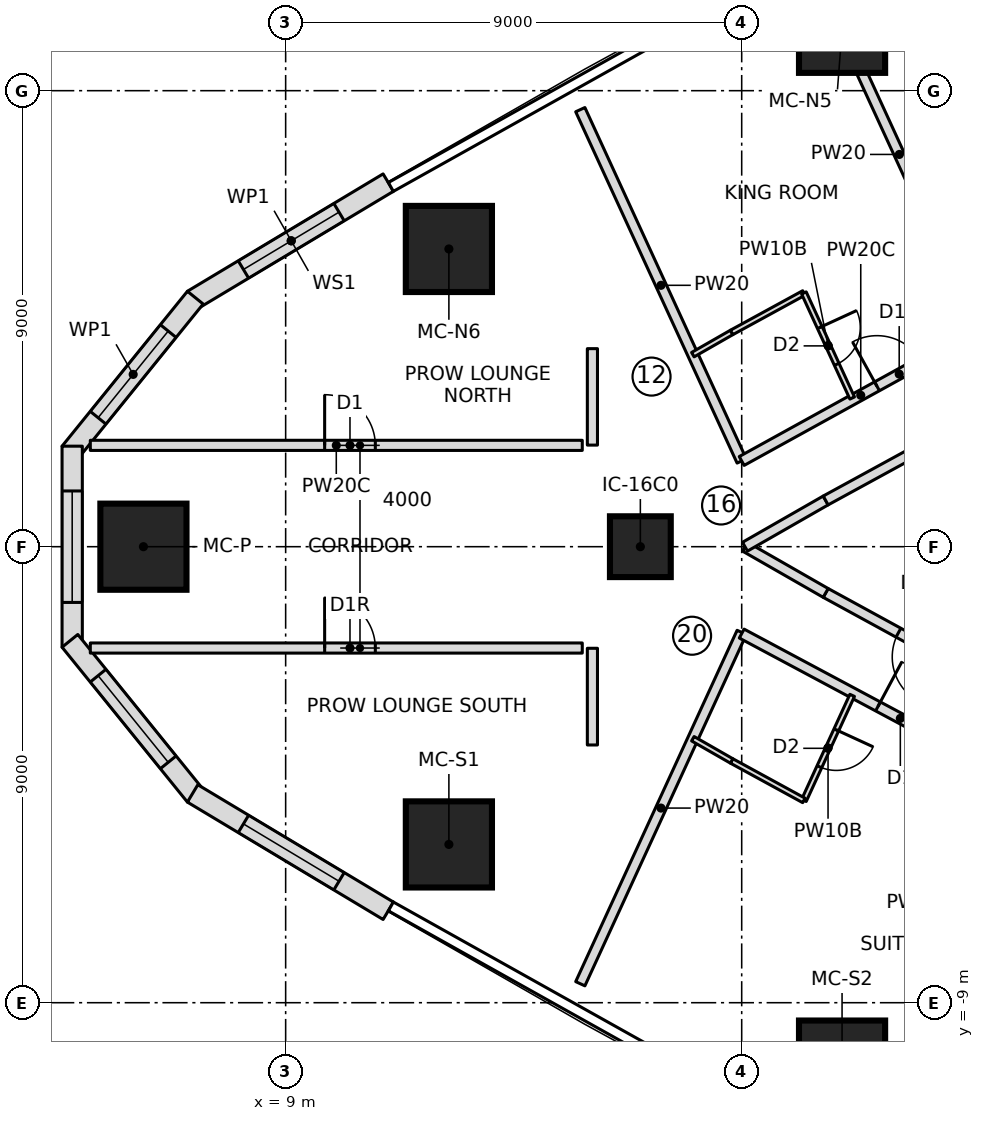
"""IFC4 building model, lengths in metres.
Left out: names, types, materials, properties, quantities, classifications, styles, units other than length and angle.
Written with IfcOpenShell. Run it as: python <this file> out.ifc"""

import sys

from ifc_helpers import new_model, si_unit, direction, frame, frame_2d, origin, origin_2d, place, context, subcontext, project, spatial, polyline, rectangle, outline, extrude, element, fill, save


model = new_model("IFC4")
c1 = context("Model", 3, precision=1e-05, world=origin(), true_north=direction((0.0, 1.0)))
c2 = subcontext(c1, "Body", "Model", "MODEL_VIEW")
j1 = project(units=[si_unit("LENGTHUNIT", "METRE"), si_unit("PLANEANGLEUNIT", "RADIAN")], contexts=[c1])
p1 = place(None, origin())
s1 = spatial("IfcSite", under=j1, at=p1, CompositionType="ELEMENT")
p2 = place(p1, origin())
s2 = spatial("IfcBuilding", under=s1, at=p2, CompositionType="ELEMENT")
p3 = place(p2, frame((0.0, 0.0, 84.9)))
s3 = spatial("IfcBuildingStorey", under=s2, at=p3, CompositionType="ELEMENT", Elevation=84.9)
for number, where, z_axis, x_axis in (
    (1, (6.193, 0.0, 0.0), (0.0, 0.0, 1.0), (1.0, 0.0, 0.0)),
    (2, (12.221, -5.876, 0.0), (0.0, 0.0, 1.0), (1.0, 0.0, 0.0)),
    (3, (19.981, -10.202, 0.0), (0.0, 0.0, 1.0), (1.0, 0.0, 0.0)),
    (4, (19.981, 10.202, 0.0), (0.0, 0.0, 1.0), (1.0, 0.0, 0.0)),
    (5, (12.221, 5.876, 0.0), (0.0, 0.0, 1.0), (1.0, 0.0, 0.0)),
):
    element("IfcColumn", number, at=place(p3, frame(where, z_axis=z_axis, x_axis=x_axis)), inside=s3, PredefinedType="COLUMN", context=c2, shape_type="SweptSolid", body=[
        extrude(rectangle(XDim=1.7, YDim=1.7, at=origin_2d()), origin(), (0.0, 0.0, 1.0), 3.55),
    ])
p4 = place(p3, frame((16.0, 0.0, 0.0), z_axis=(0.0, 0.0, 1.0), x_axis=(1.0, 0.0, 0.0)))
e6 = element("IfcColumn", 6, at=p4, inside=s3, PredefinedType="COLUMN", context=c2, shape_type="SweptSolid", body=[
    extrude(rectangle(XDim=1.2, YDim=1.2, at=origin_2d()), origin(), (0.0, 0.0, 1.0), 3.55),
])
p5 = place(p3, frame((11.026, 7.186, 0.0), z_axis=(0.0, 0.0, 1.0), x_axis=(-0.857550776474, -0.514399325202, 0.0)))
e7 = element("IfcWall", 7, at=p5, inside=s3, PredefinedType="NOTDEFINED", context=c2, shape_type="SweptSolid", body=[
    extrude(outline(polyline([(0.0, -0.2), (4.503, -0.2), (4.433, 0.2), (0.0, 0.2), (0.0, -0.2)])), origin(), (0.0, 0.0, 1.0), 3.25),
])
p6 = place(p5, frame((1.134, 0.0, 0.6)))
e8 = element("IfcOpeningElement", 8, at=p6, cuts=e7, PredefinedType="OPENING", context=c2, shape_type="SweptSolid", body=[
    extrude(outline(polyline([(0.0, 1.35), (0.084, 1.771), (0.322, 2.128), (0.679, 2.366), (1.1, 2.45), (1.521, 2.366), (1.878, 2.128), (2.116, 1.771), (2.2, 1.35), (2.2, 1.1), (2.116, 0.679), (1.878, 0.322), (1.521, 0.084), (1.1, 0.0), (0.679, 0.084), (0.322, 0.322), (0.084, 0.679), (0.0, 1.1), (0.0, 1.35)])), frame((0.0, 0.21, 0.0), z_axis=(0.0, -1.0, 0.0), x_axis=(1.0, 0.0, 0.0)), (0.0, 0.0, 1.0), 0.42),
])
p7 = place(p3, frame((7.194, 4.888, 0.0), z_axis=(0.0, 0.0, 1.0), x_axis=(-0.62903486133, -0.777377092042, 0.0)))
e9 = element("IfcWall", 9, at=p7, inside=s3, PredefinedType="NOTDEFINED", context=c2, shape_type="SweptSolid", body=[
    extrude(outline(polyline([(-0.035, -0.2), (3.897, -0.2), (3.756, 0.2), (0.035, 0.2), (-0.035, -0.2)])), origin(), (0.0, 0.0, 1.0), 3.25),
])
p8 = place(p7, frame((0.813, 0.0, 0.6)))
e10 = element("IfcOpeningElement", 10, at=p8, cuts=e9, PredefinedType="OPENING", context=c2, shape_type="SweptSolid", body=[
    extrude(outline(polyline([(0.0, 1.35), (0.084, 1.771), (0.322, 2.128), (0.679, 2.366), (1.1, 2.45), (1.521, 2.366), (1.878, 2.128), (2.116, 1.771), (2.2, 1.35), (2.2, 1.1), (2.116, 0.679), (1.878, 0.322), (1.521, 0.084), (1.1, 0.0), (0.679, 0.084), (0.322, 0.322), (0.084, 0.679), (0.0, 1.1), (0.0, 1.35)])), frame((0.0, 0.21, 0.0), z_axis=(0.0, -1.0, 0.0), x_axis=(1.0, 0.0, 0.0)), (0.0, 0.0, 1.0), 0.42),
])
p9 = place(p3, frame((4.787, 1.913, 0.0), z_axis=(0.0, 0.0, 1.0), x_axis=(0.0, -1.0, 0.0)))
e11 = element("IfcWall", 11, at=p9, inside=s3, PredefinedType="NOTDEFINED", context=c2, shape_type="SweptSolid", body=[
    extrude(outline(polyline([(-0.071, -0.2), (3.897, -0.2), (3.755, 0.2), (0.071, 0.2), (-0.071, -0.2)])), origin(), (0.0, 0.0, 1.0), 3.25),
])
p10 = place(p9, frame((0.813, 0.0, 0.6)))
e12 = element("IfcOpeningElement", 12, at=p10, cuts=e11, PredefinedType="OPENING", context=c2, shape_type="SweptSolid", body=[
    extrude(outline(polyline([(0.0, 1.35), (0.084, 1.771), (0.322, 2.128), (0.679, 2.366), (1.1, 2.45), (1.521, 2.366), (1.878, 2.128), (2.116, 1.771), (2.2, 1.35), (2.2, 1.1), (2.116, 0.679), (1.878, 0.322), (1.521, 0.084), (1.1, 0.0), (0.679, 0.084), (0.322, 0.322), (0.084, 0.679), (0.0, 1.1), (0.0, 1.35)])), frame((0.0, 0.21, 0.0), z_axis=(0.0, -1.0, 0.0), x_axis=(1.0, 0.0, 0.0)), (0.0, 0.0, 1.0), 0.42),
])
p11 = place(p3, frame((4.787, -1.913, 0.0), z_axis=(0.0, 0.0, 1.0), x_axis=(0.62903486133, -0.777377092042, 0.0)))
e13 = element("IfcWall", 13, at=p11, inside=s3, PredefinedType="NOTDEFINED", context=c2, shape_type="SweptSolid", body=[
    extrude(outline(polyline([(-0.071, -0.2), (3.862, -0.2), (3.791, 0.2), (0.071, 0.2), (-0.071, -0.2)])), origin(), (0.0, 0.0, 1.0), 3.25),
])
p12 = place(p11, frame((0.813, 0.0, 0.6)))
e14 = element("IfcOpeningElement", 14, at=p12, cuts=e13, PredefinedType="OPENING", context=c2, shape_type="SweptSolid", body=[
    extrude(outline(polyline([(0.0, 1.35), (0.084, 1.771), (0.322, 2.128), (0.679, 2.366), (1.1, 2.45), (1.521, 2.366), (1.878, 2.128), (2.116, 1.771), (2.2, 1.35), (2.2, 1.1), (2.116, 0.679), (1.878, 0.322), (1.521, 0.084), (1.1, 0.0), (0.679, 0.084), (0.322, 0.322), (0.084, 0.679), (0.0, 1.1), (0.0, 1.35)])), frame((0.0, 0.21, 0.0), z_axis=(0.0, -1.0, 0.0), x_axis=(1.0, 0.0, 0.0)), (0.0, 0.0, 1.0), 0.42),
])
p13 = place(p3, frame((7.194, -4.888, 0.0), z_axis=(0.0, 0.0, 1.0), x_axis=(0.857550776474, -0.514399325202, 0.0)))
e15 = element("IfcWall", 15, at=p13, inside=s3, PredefinedType="NOTDEFINED", context=c2, shape_type="SweptSolid", body=[
    extrude(outline(polyline([(-0.035, -0.2), (4.468, -0.2), (4.468, 0.2), (0.035, 0.2), (-0.035, -0.2)])), origin(), (0.0, 0.0, 1.0), 3.25),
])
p14 = place(p13, frame((1.134, 0.0, 0.6)))
e16 = element("IfcOpeningElement", 16, at=p14, cuts=e15, PredefinedType="OPENING", context=c2, shape_type="SweptSolid", body=[
    extrude(outline(polyline([(0.0, 1.35), (0.084, 1.771), (0.322, 2.128), (0.679, 2.366), (1.1, 2.45), (1.521, 2.366), (1.878, 2.128), (2.116, 1.771), (2.2, 1.35), (2.2, 1.1), (2.116, 0.679), (1.878, 0.322), (1.521, 0.084), (1.1, 0.0), (0.679, 0.084), (0.322, 0.322), (0.084, 0.679), (0.0, 1.1), (0.0, 1.35)])), frame((0.0, 0.21, 0.0), z_axis=(0.0, -1.0, 0.0), x_axis=(1.0, 0.0, 0.0)), (0.0, 0.0, 1.0), 0.42),
])
p15 = place(p3, frame((5.145, 2.0, 0.0), z_axis=(0.0, 0.0, 1.0), x_axis=(1.0, 0.0, 0.0)))
e17 = element("IfcWall", 17, at=p15, inside=s3, PredefinedType="PARTITIONING", context=c2, shape_type="SweptSolid", body=[
    extrude(rectangle(XDim=9.709, YDim=0.2, at=frame_2d((4.854, 0.0))), origin(), (0.0, 0.0, 1.0), 3.25),
])
p16 = place(p15, frame((4.625, 0.0, 0.0)))
e18 = element("IfcOpeningElement", 18, at=p16, cuts=e17, PredefinedType="OPENING", context=c2, shape_type="SweptSolid", body=[
    extrude(rectangle(XDim=1.0, YDim=2.1, at=frame_2d((0.5, 1.05))), frame((0.0, 0.11, 0.0), z_axis=(0.0, -1.0, 0.0), x_axis=(1.0, 0.0, 0.0)), (0.0, 0.0, 1.0), 0.22),
])
p17 = place(p3, frame((5.145, -2.0, 0.0), z_axis=(0.0, 0.0, 1.0), x_axis=(1.0, 0.0, 0.0)))
e19 = element("IfcWall", 19, at=p17, inside=s3, PredefinedType="PARTITIONING", context=c2, shape_type="SweptSolid", body=[
    extrude(rectangle(XDim=9.709, YDim=0.2, at=frame_2d((4.854, 0.0))), origin(), (0.0, 0.0, 1.0), 3.25),
])
p18 = place(p17, frame((4.625, 0.0, 0.0)))
e20 = element("IfcOpeningElement", 20, at=p18, cuts=e19, PredefinedType="OPENING", context=c2, shape_type="SweptSolid", body=[
    extrude(rectangle(XDim=1.0, YDim=2.1, at=frame_2d((0.5, 1.05))), frame((0.0, 0.11, 0.0), z_axis=(0.0, -1.0, 0.0), x_axis=(1.0, 0.0, 0.0)), (0.0, 0.0, 1.0), 0.22),
])
p19 = place(p3, frame((14.815, 8.626, 0.0), z_axis=(0.0, 0.0, 1.0), x_axis=(0.417432341259, -0.908708006166, 0.0)))
e21 = element("IfcWall", 21, at=p19, inside=s3, PredefinedType="PARTITIONING", context=c2, shape_type="SweptSolid", body=[
    extrude(rectangle(XDim=7.631, YDim=0.2, at=frame_2d((3.815, 0.0))), origin(), (0.0, 0.0, 1.0), 3.25),
])
p20 = place(p3, frame((18.0, 1.692, 0.0), z_axis=(0.0, 0.0, 1.0), x_axis=(0.875548487611, 0.483130257634, 0.0)))
e22 = element("IfcWall", 22, at=p20, inside=s3, PredefinedType="PARTITIONING", context=c2, shape_type="SweptSolid", body=[
    extrude(rectangle(XDim=5.367, YDim=0.2, at=frame_2d((2.683, 0.0))), origin(), (0.0, 0.0, 1.0), 3.25),
])
p21 = place(p20, frame((3.05, 0.0, 0.0)))
e23 = element("IfcOpeningElement", 23, at=p21, cuts=e22, PredefinedType="OPENING", context=c2, shape_type="SweptSolid", body=[
    extrude(rectangle(XDim=1.0, YDim=2.1, at=frame_2d((0.5, 1.05))), frame((0.0, 0.11, 0.0), z_axis=(0.0, -1.0, 0.0), x_axis=(1.0, 0.0, 0.0)), (0.0, 0.0, 1.0), 0.22),
])
p22 = place(p3, frame((17.036, 3.79, 0.0), z_axis=(0.0, 0.0, 1.0), x_axis=(0.867629162742, 0.497211862248, 0.0)))
e24 = element("IfcWall", 24, at=p22, inside=s3, PredefinedType="PARTITIONING", context=c2, shape_type="SweptSolid", body=[
    extrude(rectangle(XDim=0.882, YDim=0.1, at=frame_2d((0.441, 0.0))), origin(), (0.0, 0.0, 1.0), 3.25),
])
p23 = place(p3, frame((17.801, 4.229, 0.0), z_axis=(0.0, 0.0, 1.0), x_axis=(0.877424481957, 0.479714788663, 0.0)))
e25 = element("IfcWall", 25, at=p23, inside=s3, PredefinedType="PARTITIONING", context=c2, shape_type="SweptSolid", body=[
    extrude(rectangle(XDim=1.625, YDim=0.1, at=frame_2d((0.813, 0.0))), origin(), (0.0, 0.0, 1.0), 3.25),
])
p24 = place(p3, frame((19.228, 5.008, 0.0), z_axis=(0.0, 0.0, 1.0), x_axis=(0.417450047292, -0.908699872354, 0.0)))
e26 = element("IfcWall", 26, at=p24, inside=s3, PredefinedType="PARTITIONING", context=c2, shape_type="SweptSolid", body=[
    extrude(rectangle(XDim=2.283, YDim=0.1, at=frame_2d((1.141, 0.0))), origin(), (0.0, 0.0, 1.0), 3.25),
])
p25 = place(p24, frame((0.75, 0.0, 0.0)))
e27 = element("IfcOpeningElement", 27, at=p25, cuts=e26, PredefinedType="OPENING", context=c2, shape_type="SweptSolid", body=[
    extrude(rectangle(XDim=0.8, YDim=2.1, at=frame_2d((0.4, 1.05))), frame((0.0, 0.06, 0.0), z_axis=(0.0, -1.0, 0.0), x_axis=(1.0, 0.0, 0.0)), (0.0, 0.0, 1.0), 0.12),
])
p26 = place(p3, frame((22.699, 4.284, 0.0), z_axis=(0.0, 0.0, 1.0), x_axis=(-0.417413534969, 0.908716644959, 0.0)))
e28 = element("IfcWall", 28, at=p26, inside=s3, PredefinedType="PARTITIONING", context=c2, shape_type="SweptSolid", body=[
    extrude(rectangle(XDim=7.609, YDim=0.2, at=frame_2d((3.805, 0.0))), origin(), (0.0, 0.0, 1.0), 3.25),
])
p27 = place(p3, frame((14.815, -8.626, 0.0), z_axis=(0.0, 0.0, 1.0), x_axis=(0.417432341259, 0.908708006166, 0.0)))
e29 = element("IfcWall", 29, at=p27, inside=s3, PredefinedType="PARTITIONING", context=c2, shape_type="SweptSolid", body=[
    extrude(rectangle(XDim=7.631, YDim=0.2, at=frame_2d((3.815, 0.0))), origin(), (0.0, 0.0, 1.0), 3.25),
])
p28 = place(p3, frame((18.0, -1.715, 0.0), z_axis=(0.0, 0.0, 1.0), x_axis=(0.881859333365, -0.471512583244, 0.0)))
e30 = element("IfcWall", 30, at=p28, inside=s3, PredefinedType="PARTITIONING", context=c2, shape_type="SweptSolid", body=[
    extrude(rectangle(XDim=9.799, YDim=0.2, at=frame_2d((4.899, 0.0))), origin(), (0.0, 0.0, 1.0), 3.25),
])
p29 = place(p28, frame((3.05, 0.0, 0.0)))
e31 = element("IfcOpeningElement", 31, at=p29, cuts=e30, PredefinedType="OPENING", context=c2, shape_type="SweptSolid", body=[
    extrude(rectangle(XDim=1.0, YDim=2.1, at=frame_2d((0.5, 1.05))), frame((0.0, 0.11, 0.0), z_axis=(0.0, -1.0, 0.0), x_axis=(1.0, 0.0, 0.0)), (0.0, 0.0, 1.0), 0.22),
])
p30 = place(p3, frame((20.18, -2.934, 0.0), z_axis=(0.0, 0.0, 1.0), x_axis=(-0.417450047292, -0.908699872354, 0.0)))
e32 = element("IfcWall", 32, at=p30, inside=s3, PredefinedType="PARTITIONING", context=c2, shape_type="SweptSolid", body=[
    extrude(rectangle(XDim=2.283, YDim=0.1, at=frame_2d((1.141, 0.0))), origin(), (0.0, 0.0, 1.0), 3.25),
])
p31 = place(p30, frame((0.75, 0.0, 0.0)))
e33 = element("IfcOpeningElement", 33, at=p31, cuts=e32, PredefinedType="OPENING", context=c2, shape_type="SweptSolid", body=[
    extrude(rectangle(XDim=0.8, YDim=2.1, at=frame_2d((0.4, 1.05))), frame((0.0, 0.06, 0.0), z_axis=(0.0, -1.0, 0.0), x_axis=(1.0, 0.0, 0.0)), (0.0, 0.0, 1.0), 0.12),
])
p32 = place(p3, frame((19.228, -5.008, 0.0), z_axis=(0.0, 0.0, 1.0), x_axis=(-0.877424481957, 0.479714788663, 0.0)))
e34 = element("IfcWall", 34, at=p32, inside=s3, PredefinedType="PARTITIONING", context=c2, shape_type="SweptSolid", body=[
    extrude(rectangle(XDim=1.625, YDim=0.1, at=frame_2d((0.813, 0.0))), origin(), (0.0, 0.0, 1.0), 3.25),
])
p33 = place(p3, frame((17.801, -4.229, 0.0), z_axis=(0.0, 0.0, 1.0), x_axis=(-0.867629162742, 0.497211862248, 0.0)))
e35 = element("IfcWall", 35, at=p33, inside=s3, PredefinedType="PARTITIONING", context=c2, shape_type="SweptSolid", body=[
    extrude(rectangle(XDim=0.882, YDim=0.1, at=frame_2d((0.441, 0.0))), origin(), (0.0, 0.0, 1.0), 3.25),
])
p34 = place(p3, frame((23.407, -2.962, 0.0), z_axis=(0.0, 0.0, 1.0), x_axis=(-0.877465075585, 0.479640533242, 0.0)))
e36 = element("IfcWall", 36, at=p34, inside=s3, PredefinedType="PARTITIONING", context=c2, shape_type="SweptSolid", body=[
    extrude(rectangle(XDim=4.273, YDim=0.2, at=frame_2d((2.137, 0.0))), origin(), (0.0, 0.0, 1.0), 3.25),
])
p35 = place(p34, frame((1.636, 0.0, 0.0)))
e37 = element("IfcOpeningElement", 37, at=p35, cuts=e36, PredefinedType="OPENING", context=c2, shape_type="SweptSolid", body=[
    extrude(rectangle(XDim=1.0, YDim=2.1, at=frame_2d((0.5, 1.05))), frame((0.0, 0.11, 0.0), z_axis=(0.0, -1.0, 0.0), x_axis=(1.0, 0.0, 0.0)), (0.0, 0.0, 1.0), 0.22),
])
for number, where, z_axis, x_axis in (
    (38, (19.657, -0.912, 0.0), (0.0, 0.0, 1.0), (-0.868, 0.497, 0.0)),
    (39, (18.065, 0.0, 0.0), (0.0, 0.0, 1.0), (0.868, 0.497, 0.0)),
):
    element("IfcWall", number, at=place(p3, frame(where, z_axis=z_axis, x_axis=x_axis)), inside=s3, PredefinedType="PARTITIONING", context=c2, shape_type="SweptSolid", body=[
        extrude(rectangle(XDim=1.835, YDim=0.2, at=frame_2d((0.918, 0.0))), origin(), (0.0, 0.0, 1.0), 3.25),
    ])
p36 = place(p3, frame((19.657, 0.912, 0.0), z_axis=(0.0, 0.0, 1.0), x_axis=(0.877465075585, 0.479640533242, 0.0)))
e40 = element("IfcWall", 40, at=p36, inside=s3, PredefinedType="PARTITIONING", context=c2, shape_type="SweptSolid", body=[
    extrude(rectangle(XDim=4.273, YDim=0.2, at=frame_2d((2.137, 0.0))), origin(), (0.0, 0.0, 1.0), 3.25),
])
p37 = place(p3, frame((15.054, 3.909, 0.0), z_axis=(0.0, 0.0, 1.0), x_axis=(0.0, -1.0, 0.0)))
e41 = element("IfcWall", 41, at=p37, inside=s3, PredefinedType="PARTITIONING", context=c2, shape_type="SweptSolid", body=[
    extrude(rectangle(XDim=1.904, YDim=0.2, at=frame_2d((0.952, 0.0))), origin(), (0.0, 0.0, 1.0), 3.25),
])
p38 = place(p3, frame((15.054, -2.005, 0.0), z_axis=(0.0, 0.0, 1.0), x_axis=(0.0, -1.0, 0.0)))
e42 = element("IfcWall", 42, at=p38, inside=s3, PredefinedType="PARTITIONING", context=c2, shape_type="SweptSolid", body=[
    extrude(rectangle(XDim=1.908, YDim=0.2, at=frame_2d((0.954, 0.0))), origin(), (0.0, 0.0, 1.0), 3.25),
])
p39 = place(p6, origin())
e43 = element("IfcWindow", 43, at=p39, inside=s3, PartitioningType="SINGLE_PANEL", PredefinedType="WINDOW", context=c2, shape_type="SweptSolid", body=[
    extrude(outline(polyline([(0.0, 1.35), (0.084, 1.771), (0.322, 2.128), (0.679, 2.366), (1.1, 2.45), (1.521, 2.366), (1.878, 2.128), (2.116, 1.771), (2.2, 1.35), (2.2, 1.1), (2.116, 0.679), (1.878, 0.322), (1.521, 0.084), (1.1, 0.0), (0.679, 0.084), (0.322, 0.322), (0.084, 0.679), (0.0, 1.1), (0.0, 1.35)])), frame((0.0, 0.17, 0.0), z_axis=(0.0, -1.0, 0.0), x_axis=(1.0, 0.0, 0.0)), (0.0, 0.0, 1.0), 0.06),
])
fill(e8, e43)
p40 = place(p8, origin())
e44 = element("IfcWindow", 44, at=p40, inside=s3, PartitioningType="SINGLE_PANEL", PredefinedType="WINDOW", context=c2, shape_type="SweptSolid", body=[
    extrude(outline(polyline([(0.0, 1.35), (0.084, 1.771), (0.322, 2.128), (0.679, 2.366), (1.1, 2.45), (1.521, 2.366), (1.878, 2.128), (2.116, 1.771), (2.2, 1.35), (2.2, 1.1), (2.116, 0.679), (1.878, 0.322), (1.521, 0.084), (1.1, 0.0), (0.679, 0.084), (0.322, 0.322), (0.084, 0.679), (0.0, 1.1), (0.0, 1.35)])), frame((0.0, 0.17, 0.0), z_axis=(0.0, -1.0, 0.0), x_axis=(1.0, 0.0, 0.0)), (0.0, 0.0, 1.0), 0.06),
])
fill(e10, e44)
p41 = place(p10, origin())
e45 = element("IfcWindow", 45, at=p41, inside=s3, PartitioningType="SINGLE_PANEL", PredefinedType="WINDOW", context=c2, shape_type="SweptSolid", body=[
    extrude(outline(polyline([(0.0, 1.35), (0.084, 1.771), (0.322, 2.128), (0.679, 2.366), (1.1, 2.45), (1.521, 2.366), (1.878, 2.128), (2.116, 1.771), (2.2, 1.35), (2.2, 1.1), (2.116, 0.679), (1.878, 0.322), (1.521, 0.084), (1.1, 0.0), (0.679, 0.084), (0.322, 0.322), (0.084, 0.679), (0.0, 1.1), (0.0, 1.35)])), frame((0.0, 0.17, 0.0), z_axis=(0.0, -1.0, 0.0), x_axis=(1.0, 0.0, 0.0)), (0.0, 0.0, 1.0), 0.06),
])
fill(e12, e45)
p42 = place(p12, origin())
e46 = element("IfcWindow", 46, at=p42, inside=s3, PartitioningType="SINGLE_PANEL", PredefinedType="WINDOW", context=c2, shape_type="SweptSolid", body=[
    extrude(outline(polyline([(0.0, 1.35), (0.084, 1.771), (0.322, 2.128), (0.679, 2.366), (1.1, 2.45), (1.521, 2.366), (1.878, 2.128), (2.116, 1.771), (2.2, 1.35), (2.2, 1.1), (2.116, 0.679), (1.878, 0.322), (1.521, 0.084), (1.1, 0.0), (0.679, 0.084), (0.322, 0.322), (0.084, 0.679), (0.0, 1.1), (0.0, 1.35)])), frame((0.0, 0.17, 0.0), z_axis=(0.0, -1.0, 0.0), x_axis=(1.0, 0.0, 0.0)), (0.0, 0.0, 1.0), 0.06),
])
fill(e14, e46)
p43 = place(p14, origin())
e47 = element("IfcWindow", 47, at=p43, inside=s3, PartitioningType="SINGLE_PANEL", PredefinedType="WINDOW", context=c2, shape_type="SweptSolid", body=[
    extrude(outline(polyline([(0.0, 1.35), (0.084, 1.771), (0.322, 2.128), (0.679, 2.366), (1.1, 2.45), (1.521, 2.366), (1.878, 2.128), (2.116, 1.771), (2.2, 1.35), (2.2, 1.1), (2.116, 0.679), (1.878, 0.322), (1.521, 0.084), (1.1, 0.0), (0.679, 0.084), (0.322, 0.322), (0.084, 0.679), (0.0, 1.1), (0.0, 1.35)])), frame((0.0, 0.17, 0.0), z_axis=(0.0, -1.0, 0.0), x_axis=(1.0, 0.0, 0.0)), (0.0, 0.0, 1.0), 0.06),
])
fill(e16, e47)
p44 = place(p16, origin())
e48 = element("IfcDoor", 48, at=p44, inside=s3, OperationType="SINGLE_SWING_LEFT", PredefinedType="DOOR", context=c2, shape_type="SweptSolid", body=[
    extrude(rectangle(XDim=1.0, YDim=2.1, at=frame_2d((0.5, 1.05))), frame((0.0, 0.025, 0.0), z_axis=(0.0, -1.0, 0.0), x_axis=(1.0, 0.0, 0.0)), (0.0, 0.0, 1.0), 0.05),
])
fill(e18, e48)
p45 = place(p18, origin())
e49 = element("IfcDoor", 49, at=p45, inside=s3, OperationType="SINGLE_SWING_RIGHT", PredefinedType="DOOR", context=c2, shape_type="SweptSolid", body=[
    extrude(rectangle(XDim=1.0, YDim=2.1, at=frame_2d((0.5, 1.05))), frame((0.0, 0.025, 0.0), z_axis=(0.0, -1.0, 0.0), x_axis=(1.0, 0.0, 0.0)), (0.0, 0.0, 1.0), 0.05),
])
fill(e20, e49)
p46 = place(p25, origin())
e50 = element("IfcDoor", 50, at=p46, inside=s3, OperationType="SINGLE_SWING_LEFT", PredefinedType="DOOR", context=c2, shape_type="SweptSolid", body=[
    extrude(rectangle(XDim=0.8, YDim=2.1, at=frame_2d((0.4, 1.05))), frame((0.0, 0.025, 0.0), z_axis=(0.0, -1.0, 0.0), x_axis=(1.0, 0.0, 0.0)), (0.0, 0.0, 1.0), 0.05),
])
fill(e27, e50)
p47 = place(p21, origin())
e51 = element("IfcDoor", 51, at=p47, inside=s3, OperationType="SINGLE_SWING_RIGHT", PredefinedType="DOOR", context=c2, shape_type="SweptSolid", body=[
    extrude(rectangle(XDim=1.0, YDim=2.1, at=frame_2d((0.5, 1.05))), frame((0.0, 0.025, 0.0), z_axis=(0.0, -1.0, 0.0), x_axis=(1.0, 0.0, 0.0)), (0.0, 0.0, 1.0), 0.05),
])
fill(e23, e51)
p48 = place(p31, origin())
e52 = element("IfcDoor", 52, at=p48, inside=s3, OperationType="SINGLE_SWING_LEFT", PredefinedType="DOOR", context=c2, shape_type="SweptSolid", body=[
    extrude(rectangle(XDim=0.8, YDim=2.1, at=frame_2d((0.4, 1.05))), frame((0.0, 0.025, 0.0), z_axis=(0.0, -1.0, 0.0), x_axis=(1.0, 0.0, 0.0)), (0.0, 0.0, 1.0), 0.05),
])
fill(e33, e52)
p49 = place(p29, origin())
e53 = element("IfcDoor", 53, at=p49, inside=s3, OperationType="SINGLE_SWING_LEFT", PredefinedType="DOOR", context=c2, shape_type="SweptSolid", body=[
    extrude(rectangle(XDim=1.0, YDim=2.1, at=frame_2d((0.5, 1.05))), frame((0.0, 0.025, 0.0), z_axis=(0.0, -1.0, 0.0), x_axis=(1.0, 0.0, 0.0)), (0.0, 0.0, 1.0), 0.05),
])
fill(e31, e53)
p50 = place(p35, origin())
e54 = element("IfcDoor", 54, at=p50, inside=s3, OperationType="SINGLE_SWING_RIGHT", PredefinedType="DOOR", context=c2, shape_type="SweptSolid", body=[
    extrude(rectangle(XDim=1.0, YDim=2.1, at=frame_2d((0.5, 1.05))), frame((0.0, 0.025, 0.0), z_axis=(0.0, -1.0, 0.0), x_axis=(1.0, 0.0, 0.0)), (0.0, 0.0, 1.0), 0.05),
])
fill(e37, e54)
save(model, sys.argv[1])
